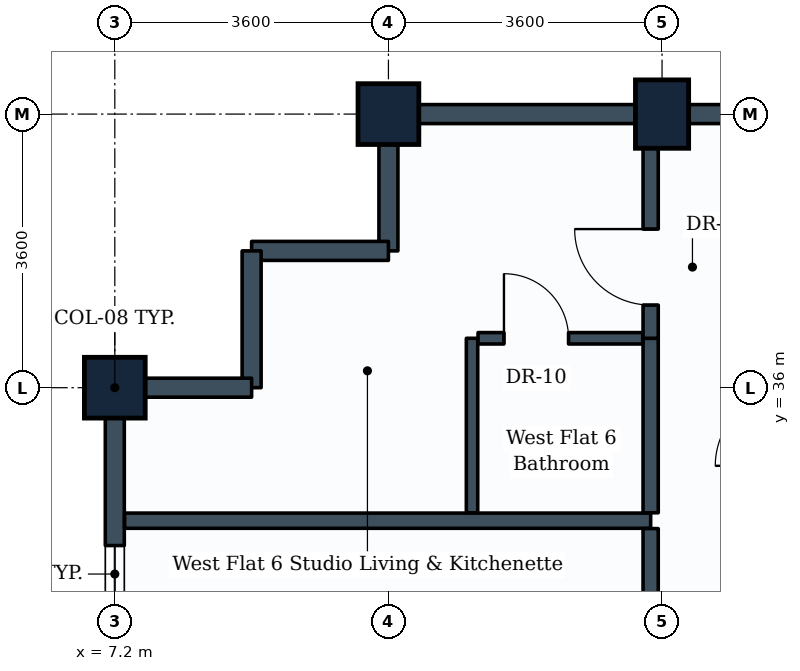
"""IFC4 building model, lengths in metres.
Left out: names, types, materials, properties, quantities, classifications, styles, units other than length and angle.
Written with IfcOpenShell. Run it as: python <this file> out.ifc"""

import sys

from ifc_helpers import new_model, si_unit, direction, frame, frame_2d, origin, origin_2d, place, context, subcontext, project, spatial, rectangle, extrude, element, fill, save


model = new_model("IFC4")
c1 = context("Model", 3, precision=1e-05, world=origin(), true_north=direction((0.0, 1.0)))
c2 = subcontext(c1, "Body", "Model", "MODEL_VIEW")
j1 = project(units=[si_unit("LENGTHUNIT", "METRE"), si_unit("PLANEANGLEUNIT", "RADIAN")], contexts=[c1])
p1 = place(None, origin())
s1 = spatial("IfcSite", under=j1, at=p1, CompositionType="ELEMENT")
p2 = place(p1, origin())
s2 = spatial("IfcBuilding", under=s1, at=p2, CompositionType="ELEMENT")
p3 = place(p2, frame((0.0, 0.0, 182.4)))
s3 = spatial("IfcBuildingStorey", under=s2, at=p3, CompositionType="ELEMENT", Elevation=182.4)
for number, where, z_axis, x_axis in (
    (1, (7.2, 36.0, 0.0), (0.0, 0.0, 1.0), (0.0, 1.0, 0.0)),
    (2, (10.8, 39.6, 0.0), (0.0, 0.0, 1.0), (1.0, 0.0, 0.0)),
):
    element("IfcColumn", number, at=place(p3, frame(where, z_axis=z_axis, x_axis=x_axis)), inside=s3, PredefinedType="COLUMN", context=c2, shape_type="SweptSolid", body=[
        extrude(rectangle(XDim=0.8, YDim=0.8, at=origin_2d()), origin(), (0.0, 0.0, 1.0), 3.8),
    ])
p4 = place(p3, frame((14.4, 39.6, 0.0), z_axis=(0.0, 0.0, 1.0), x_axis=(1.0, 0.0, 0.0)))
e3 = element("IfcColumn", 3, at=p4, inside=s3, PredefinedType="COLUMN", context=c2, shape_type="SweptSolid", body=[
    extrude(rectangle(XDim=0.7, YDim=0.9, at=origin_2d()), origin(), (0.0, 0.0, 1.0), 3.8),
])
p5 = place(p3, frame((14.4, 39.6, 0.0), z_axis=(0.0, 0.0, 1.0), x_axis=(1.0, 0.0, 0.0)))
e4 = element("IfcWall", 4, at=p5, inside=s3, PredefinedType="STANDARD", context=c2, shape_type="SweptSolid", body=[
    extrude(rectangle(XDim=3.6, YDim=0.25, at=frame_2d((1.8, 0.0))), origin(), (0.0, 0.0, 1.0), 2.93),
])
p6 = place(p3, frame((10.8, 39.6, 0.0), z_axis=(0.0, 0.0, 1.0), x_axis=(1.0, 0.0, 0.0)))
e5 = element("IfcWall", 5, at=p6, inside=s3, PredefinedType="STANDARD", context=c2, shape_type="SweptSolid", body=[
    extrude(rectangle(XDim=3.6, YDim=0.25, at=frame_2d((1.8, 0.0))), origin(), (0.0, 0.0, 1.0), 2.93),
])
p7 = place(p3, frame((10.8, 37.8, 0.0), z_axis=(0.0, 0.0, 1.0), x_axis=(0.0, 1.0, 0.0)))
e6 = element("IfcWall", 6, at=p7, inside=s3, PredefinedType="STANDARD", context=c2, shape_type="SweptSolid", body=[
    extrude(rectangle(XDim=1.8, YDim=0.25, at=frame_2d((0.9, 0.0))), origin(), (0.0, 0.0, 1.0), 2.93),
])
for number, where, z_axis, x_axis in (
    (7, (9.0, 37.8, 0.0), (0.0, 0.0, 1.0), (1.0, 0.0, 0.0)),
    (8, (9.0, 36.0, 0.0), (0.0, 0.0, 1.0), (0.0, 1.0, 0.0)),
):
    element("IfcWall", number, at=place(p3, frame(where, z_axis=z_axis, x_axis=x_axis)), inside=s3, PredefinedType="STANDARD", context=c2, shape_type="SweptSolid", body=[
        extrude(rectangle(XDim=1.8, YDim=0.25, at=frame_2d((0.9, 0.0))), origin(), (0.0, 0.0, 1.0), 3.535),
    ])
p8 = place(p3, frame((7.2, 36.0, 0.0), z_axis=(0.0, 0.0, 1.0), x_axis=(1.0, 0.0, 0.0)))
e9 = element("IfcWall", 9, at=p8, inside=s3, PredefinedType="STANDARD", context=c2, shape_type="SweptSolid", body=[
    extrude(rectangle(XDim=1.8, YDim=0.25, at=frame_2d((0.9, 0.0))), origin(), (0.0, 0.0, 1.0), 2.93),
])
p9 = place(p3, frame((7.2, 32.4, 0.0), z_axis=(0.0, 0.0, 1.0), x_axis=(0.0, 1.0, 0.0)))
e10 = element("IfcWall", 10, at=p9, inside=s3, PredefinedType="STANDARD", context=c2, shape_type="SweptSolid", body=[
    extrude(rectangle(XDim=3.6, YDim=0.25, at=frame_2d((1.8, 0.0))), origin(), (0.0, 0.0, 1.0), 2.93),
])
p10 = place(p9, frame((0.773, 0.0, 0.85)))
e11 = element("IfcOpeningElement", 11, at=p10, cuts=e10, PredefinedType="OPENING", context=c2, shape_type="SweptSolid", body=[
    extrude(rectangle(XDim=0.75, YDim=1.05, at=frame_2d((0.375, 0.525))), frame((0.0, 0.135, 0.0), z_axis=(0.0, -1.0, 0.0), x_axis=(1.0, 0.0, 0.0)), (0.0, 0.0, 1.0), 0.27),
])
p11 = place(p3, frame((7.329, 34.25, 0.0), z_axis=(0.0, 0.0, 1.0), x_axis=(1.0, 0.0, 0.0)))
e12 = element("IfcWall", 12, at=p11, inside=s3, PredefinedType="PARTITIONING", context=c2, shape_type="SweptSolid", body=[
    extrude(rectangle(XDim=6.921, YDim=0.2, at=frame_2d((3.46, 0.0))), origin(), (0.0, 0.0, 1.0), 2.93),
])
p12 = place(p3, frame((14.25, 31.27, 0.0), z_axis=(0.0, 0.0, 1.0), x_axis=(0.0, 1.0, 0.0)))
e13 = element("IfcWall", 13, at=p12, inside=s3, PredefinedType="PARTITIONING", context=c2, shape_type="SweptSolid", body=[
    extrude(rectangle(XDim=2.876, YDim=0.2, at=frame_2d((1.438, 0.0))), origin(), (0.0, 0.0, 1.0), 3.17),
])
p13 = place(p3, frame((14.25, 34.354, 0.0), z_axis=(0.0, 0.0, 1.0), x_axis=(0.0, 1.0, 0.0)))
e14 = element("IfcWall", 14, at=p13, inside=s3, PredefinedType="PARTITIONING", context=c2, shape_type="SweptSolid", body=[
    extrude(rectangle(XDim=2.296, YDim=0.2, at=frame_2d((1.148, 0.0))), origin(), (0.0, 0.0, 1.0), 3.535),
])
p14 = place(p3, frame((11.9, 34.354, 0.0), z_axis=(0.0, 0.0, 1.0), x_axis=(0.0, 1.0, 0.0)))
e15 = element("IfcWall", 15, at=p14, inside=s3, PredefinedType="PARTITIONING", context=c2, shape_type="SweptSolid", body=[
    extrude(rectangle(XDim=2.296, YDim=0.15, at=frame_2d((1.148, 0.0))), origin(), (0.0, 0.0, 1.0), 3.535),
])
p15 = place(p3, frame((11.979, 36.65, 0.0), z_axis=(0.0, 0.0, 1.0), x_axis=(1.0, 0.0, 0.0)))
e16 = element("IfcWall", 16, at=p15, inside=s3, PredefinedType="PARTITIONING", context=c2, shape_type="SweptSolid", body=[
    extrude(rectangle(XDim=2.167, YDim=0.15, at=frame_2d((1.083, 0.0))), origin(), (0.0, 0.0, 1.0), 3.535),
])
p16 = place(p15, frame((0.341, 0.0, 0.0)))
e17 = element("IfcOpeningElement", 17, at=p16, cuts=e16, PredefinedType="OPENING", context=c2, shape_type="SweptSolid", body=[
    extrude(rectangle(XDim=0.85, YDim=2.1, at=frame_2d((0.425, 1.05))), frame((0.0, 0.085, 0.0), z_axis=(0.0, -1.0, 0.0), x_axis=(1.0, 0.0, 0.0)), (0.0, 0.0, 1.0), 0.17),
])
p17 = place(p3, frame((14.25, 36.65, 0.0), z_axis=(0.0, 0.0, 1.0), x_axis=(0.0, 1.0, 0.0)))
e18 = element("IfcWall", 18, at=p17, inside=s3, PredefinedType="PARTITIONING", context=c2, shape_type="SweptSolid", body=[
    extrude(rectangle(XDim=2.821, YDim=0.2, at=frame_2d((1.411, 0.0))), origin(), (0.0, 0.0, 1.0), 2.93),
])
p18 = place(p17, frame((0.437, 0.0, 0.0)))
e19 = element("IfcOpeningElement", 19, at=p18, cuts=e18, PredefinedType="OPENING", context=c2, shape_type="SweptSolid", body=[
    extrude(rectangle(XDim=1.0, YDim=2.1, at=frame_2d((0.5, 1.05))), frame((0.0, 0.11, 0.0), z_axis=(0.0, -1.0, 0.0), x_axis=(1.0, 0.0, 0.0)), (0.0, 0.0, 1.0), 0.22),
])
p19 = place(p16, origin())
e20 = element("IfcDoor", 20, at=p19, inside=s3, OperationType="SINGLE_SWING_LEFT", PredefinedType="DOOR", context=c2, shape_type="SweptSolid", body=[
    extrude(rectangle(XDim=0.85, YDim=2.1, at=frame_2d((0.425, 1.05))), frame((0.0, 0.025, 0.0), z_axis=(0.0, -1.0, 0.0), x_axis=(1.0, 0.0, 0.0)), (0.0, 0.0, 1.0), 0.05),
])
fill(e17, e20)
p20 = place(p18, origin())
e21 = element("IfcDoor", 21, at=p20, inside=s3, OperationType="SINGLE_SWING_RIGHT", PredefinedType="DOOR", context=c2, shape_type="SweptSolid", body=[
    extrude(rectangle(XDim=1.0, YDim=2.1, at=frame_2d((0.5, 1.05))), frame((0.0, 0.025, 0.0), z_axis=(0.0, -1.0, 0.0), x_axis=(1.0, 0.0, 0.0)), (0.0, 0.0, 1.0), 0.05),
])
fill(e19, e21)
p21 = place(p10, origin())
e22 = element("IfcWindow", 22, at=p21, inside=s3, PartitioningType="SINGLE_PANEL", PredefinedType="WINDOW", context=c2, shape_type="SweptSolid", body=[
    extrude(rectangle(XDim=0.75, YDim=1.05, at=frame_2d((0.375, 0.525))), frame((0.0, 0.03, 0.0), z_axis=(0.0, -1.0, 0.0), x_axis=(1.0, 0.0, 0.0)), (0.0, 0.0, 1.0), 0.06),
])
fill(e11, e22)
save(model, sys.argv[1])
